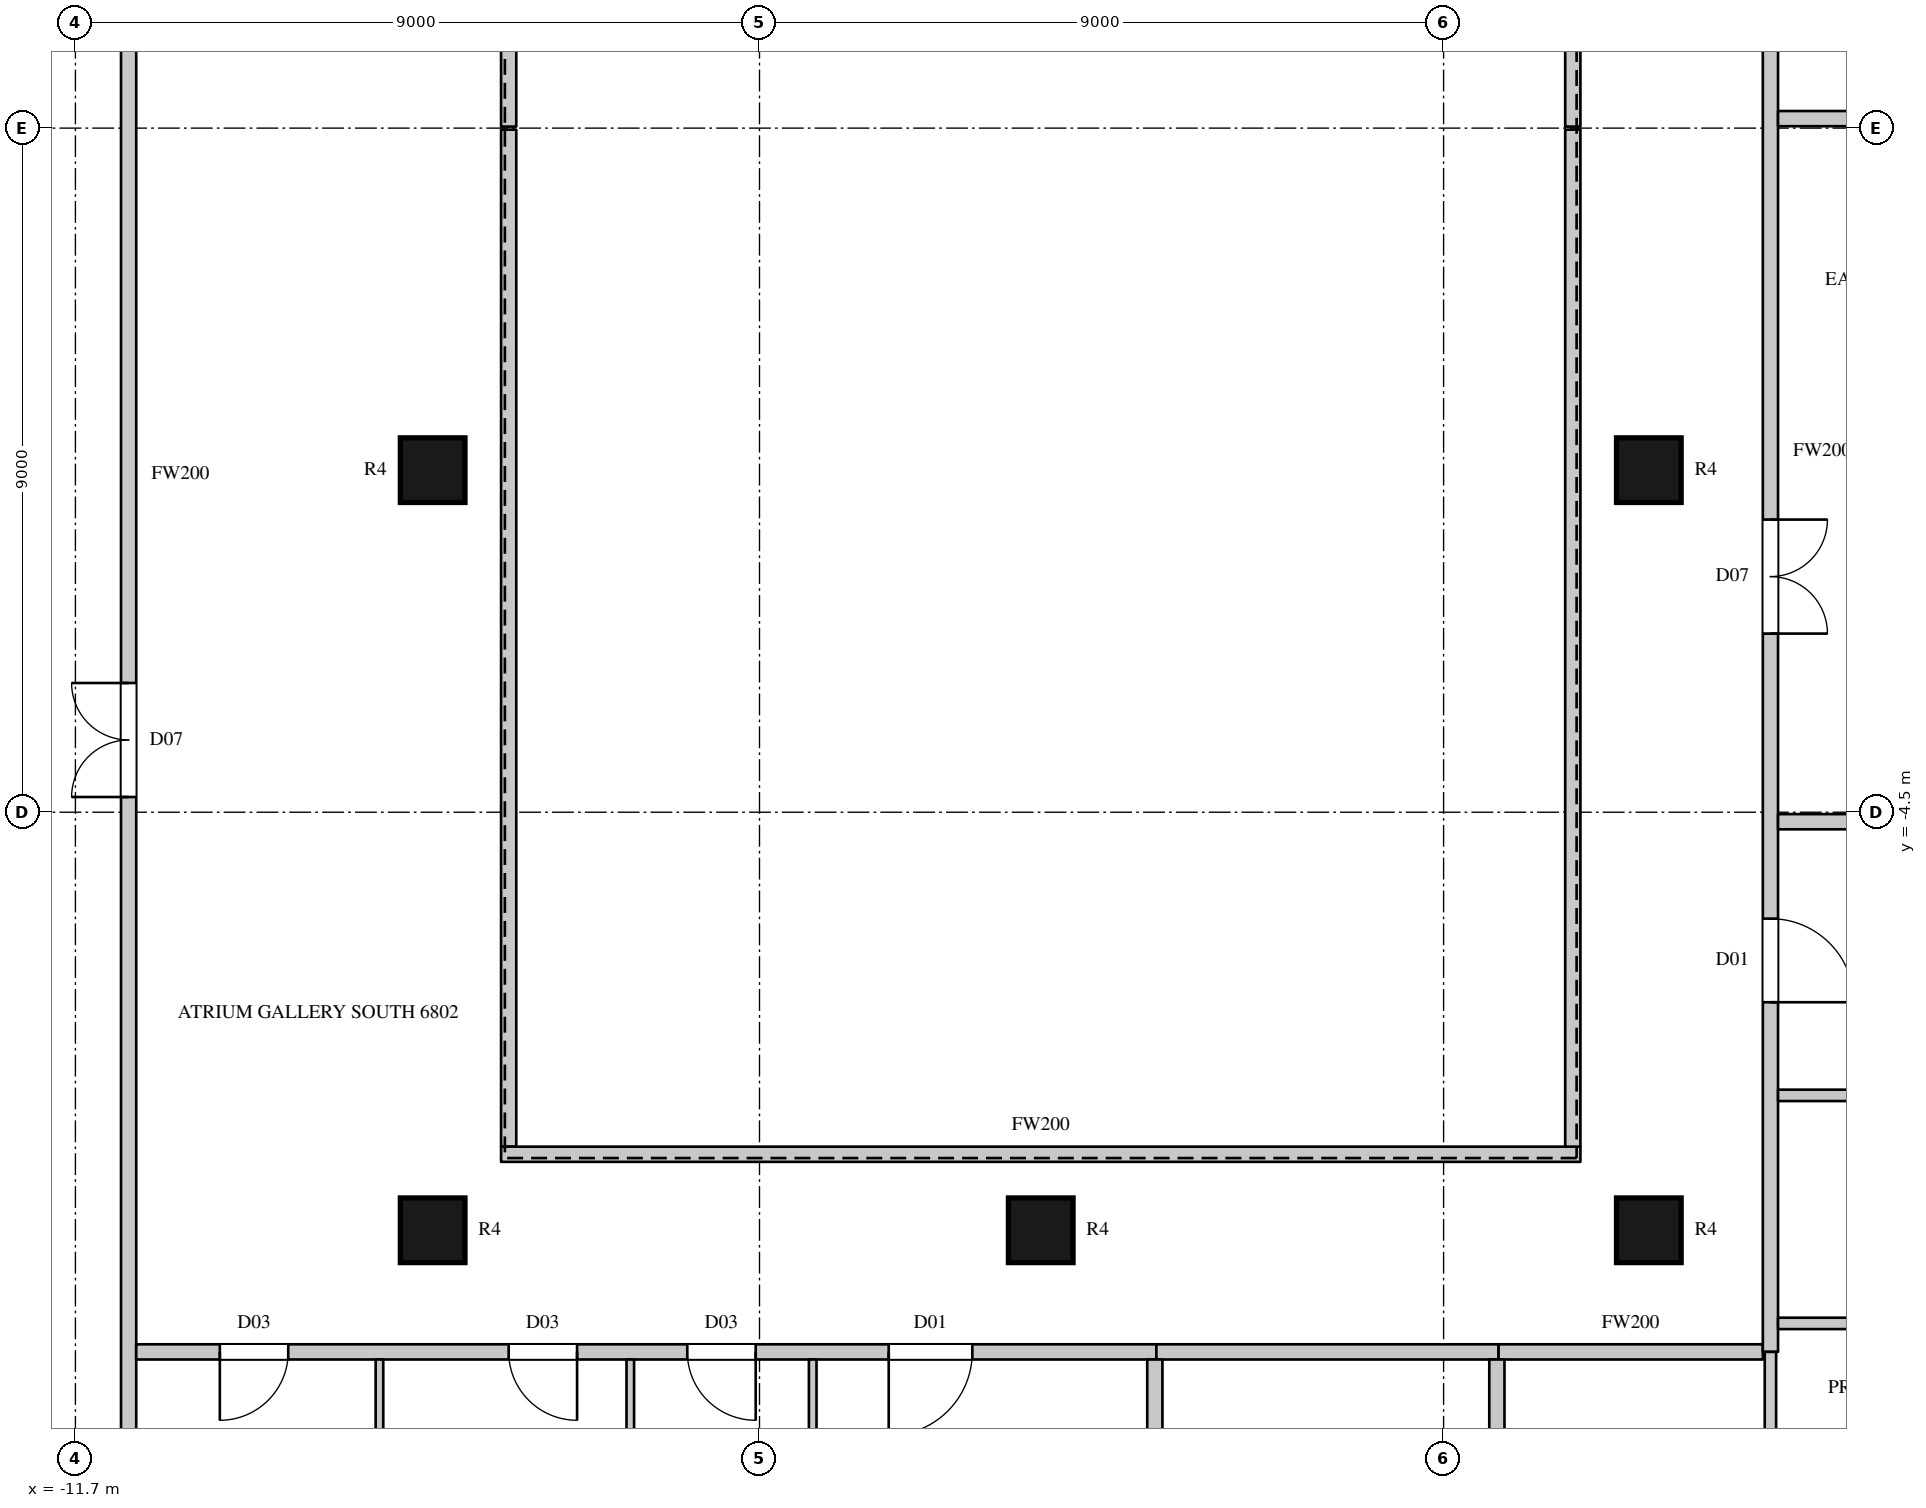
"""IFC4 building model, lengths in metres.
Left out: names, types, materials, properties, quantities, classifications, styles, units other than length and angle.
Written with IfcOpenShell. Run it as: python <this file> out.ifc"""

import sys

from ifc_helpers import new_model, si_unit, direction, frame, frame_2d, origin, origin_2d, place, context, subcontext, project, spatial, rectangle, circle, extrude, element, fill, save


model = new_model("IFC4")
c1 = context("Model", 3, precision=1e-05, world=origin(), true_north=direction((0.0, 1.0)))
c2 = subcontext(c1, "Body", "Model", "MODEL_VIEW")
j1 = project(units=[si_unit("LENGTHUNIT", "METRE"), si_unit("PLANEANGLEUNIT", "RADIAN")], contexts=[c1])
p1 = place(None, origin())
s1 = spatial("IfcSite", under=j1, at=p1, CompositionType="ELEMENT")
p2 = place(p1, origin())
s2 = spatial("IfcBuilding", under=s1, at=p2, CompositionType="ELEMENT")
p3 = place(p2, frame((0.0, 0.0, 300.8)))
s3 = spatial("IfcBuildingStorey", under=s2, at=p3, CompositionType="ELEMENT", Elevation=300.8)
for number, where, z_axis, x_axis in (
    (1, (-7.0, -10.0, 0.0), (0.0, 0.0, 1.0), (1.0, 0.0, 0.0)),
    (2, (-7.0, 0.0, 0.0), (0.0, 0.0, 1.0), (1.0, 0.0, 0.0)),
    (3, (1.0, -10.0, 0.0), (0.0, 0.0, 1.0), (1.0, 0.0, 0.0)),
    (4, (9.0, -10.0, 0.0), (0.0, 0.0, 1.0), (1.0, 0.0, 0.0)),
    (5, (9.0, 0.0, 0.0), (0.0, 0.0, 1.0), (1.0, 0.0, 0.0)),
):
    element("IfcColumn", number, at=place(p3, frame(where, z_axis=z_axis, x_axis=x_axis)), inside=s3, PredefinedType="COLUMN", context=c2, shape_type="SweptSolid", body=[
        extrude(circle(Radius=0.425, at=origin_2d()), origin(), (0.0, 0.0, 1.0), 4.1),
    ])
p4 = place(p3, frame((-11.0, -14.8, 0.0), z_axis=(0.0, 0.0, 1.0), x_axis=(0.0, 1.0, 0.0)))
e6 = element("IfcWall", 6, at=p4, inside=s3, PredefinedType="PARTITIONING", context=c2, shape_type="SweptSolid", body=[
    extrude(rectangle(XDim=29.5, YDim=0.2, at=frame_2d((14.75, 0.0))), origin(), (0.0, 0.0, 1.0), 3.8),
])
p5 = place(p4, frame((10.5, 0.0, 0.0)))
e7 = element("IfcOpeningElement", 7, at=p5, cuts=e6, PredefinedType="OPENING", context=c2, shape_type="SweptSolid", body=[
    extrude(rectangle(XDim=1.5, YDim=2.4, at=frame_2d((0.75, 1.2))), frame((0.0, 0.11, 0.0), z_axis=(0.0, -1.0, 0.0), x_axis=(1.0, 0.0, 0.0)), (0.0, 0.0, 1.0), 0.22),
])
p6 = place(p3, frame((-10.9, -11.6, 0.0), z_axis=(0.0, 0.0, 1.0), x_axis=(1.0, 0.0, 0.0)))
e8 = element("IfcWall", 8, at=p6, inside=s3, PredefinedType="PARTITIONING", context=c2, shape_type="SweptSolid", body=[
    extrude(rectangle(XDim=13.421, YDim=0.2, at=frame_2d((6.71, 0.0))), origin(), (0.0, 0.0, 1.0), 3.8),
])
p7 = place(p6, frame((1.1, 0.0, 0.0)))
e9 = element("IfcOpeningElement", 9, at=p7, cuts=e8, PredefinedType="OPENING", context=c2, shape_type="SweptSolid", body=[
    extrude(rectangle(XDim=0.9, YDim=2.2, at=frame_2d((0.45, 1.1))), frame((0.0, 0.11, 0.0), z_axis=(0.0, -1.0, 0.0), x_axis=(1.0, 0.0, 0.0)), (0.0, 0.0, 1.0), 0.22),
])
p8 = place(p6, frame((4.9, 0.0, 0.0)))
e10 = element("IfcOpeningElement", 10, at=p8, cuts=e8, PredefinedType="OPENING", context=c2, shape_type="SweptSolid", body=[
    extrude(rectangle(XDim=0.9, YDim=2.2, at=frame_2d((0.45, 1.1))), frame((0.0, 0.11, 0.0), z_axis=(0.0, -1.0, 0.0), x_axis=(1.0, 0.0, 0.0)), (0.0, 0.0, 1.0), 0.22),
])
p9 = place(p6, frame((7.25, 0.0, 0.0)))
e11 = element("IfcOpeningElement", 11, at=p9, cuts=e8, PredefinedType="OPENING", context=c2, shape_type="SweptSolid", body=[
    extrude(rectangle(XDim=0.9, YDim=2.2, at=frame_2d((0.45, 1.1))), frame((0.0, 0.11, 0.0), z_axis=(0.0, -1.0, 0.0), x_axis=(1.0, 0.0, 0.0)), (0.0, 0.0, 1.0), 0.22),
])
p10 = place(p6, frame((9.9, 0.0, 0.0)))
e12 = element("IfcOpeningElement", 12, at=p10, cuts=e8, PredefinedType="OPENING", context=c2, shape_type="SweptSolid", body=[
    extrude(rectangle(XDim=1.1, YDim=2.4, at=frame_2d((0.55, 1.2))), frame((0.0, 0.11, 0.0), z_axis=(0.0, -1.0, 0.0), x_axis=(1.0, 0.0, 0.0)), (0.0, 0.0, 1.0), 0.22),
])
p11 = place(p3, frame((-6.0, -8.9, 0.0), z_axis=(0.0, 0.0, 1.0), x_axis=(0.0, 1.0, 0.0)))
e13 = element("IfcWall", 13, at=p11, inside=s3, PredefinedType="PARTITIONING", context=c2, shape_type="SweptSolid", body=[
    extrude(rectangle(XDim=13.38, YDim=0.2, at=frame_2d((6.69, 0.0))), origin(), (0.0, 0.0, 1.0), 3.8),
])
p12 = place(p3, frame((-6.1, -9.0, 0.0), z_axis=(0.0, 0.0, 1.0), x_axis=(1.0, 0.0, 0.0)))
e14 = element("IfcWall", 14, at=p12, inside=s3, PredefinedType="PARTITIONING", context=c2, shape_type="SweptSolid", body=[
    extrude(rectangle(XDim=14.2, YDim=0.2, at=frame_2d((7.1, 0.0))), origin(), (0.0, 0.0, 1.0), 3.8),
])
p13 = place(p3, frame((-6.0, 4.52, 0.0), z_axis=(0.0, 0.0, 1.0), x_axis=(0.0, 1.0, 0.0)))
e15 = element("IfcWall", 15, at=p13, inside=s3, PredefinedType="PARTITIONING", context=c2, shape_type="SweptSolid", body=[
    extrude(rectangle(XDim=4.38, YDim=0.2, at=frame_2d((2.19, 0.0))), origin(), (0.0, 0.0, 1.0), 3.8),
])
p14 = place(p3, frame((7.021, -11.6, 0.0), z_axis=(0.0, 0.0, 1.0), x_axis=(1.0, 0.0, 0.0)))
e16 = element("IfcWall", 16, at=p14, inside=s3, PredefinedType="PARTITIONING", context=c2, shape_type="SweptSolid", body=[
    extrude(rectangle(XDim=3.479, YDim=0.2, at=frame_2d((1.74, 0.0))), origin(), (0.0, 0.0, 1.0), 3.8),
])
p15 = place(p3, frame((8.0, -8.9, 0.0), z_axis=(0.0, 0.0, 1.0), x_axis=(0.0, 1.0, 0.0)))
e17 = element("IfcWall", 17, at=p15, inside=s3, PredefinedType="PARTITIONING", context=c2, shape_type="SweptSolid", body=[
    extrude(rectangle(XDim=13.38, YDim=0.2, at=frame_2d((6.69, 0.0))), origin(), (0.0, 0.0, 1.0), 3.8),
])
p16 = place(p3, frame((8.0, 4.52, 0.0), z_axis=(0.0, 0.0, 1.0), x_axis=(0.0, 1.0, 0.0)))
e18 = element("IfcWall", 18, at=p16, inside=s3, PredefinedType="PARTITIONING", context=c2, shape_type="SweptSolid", body=[
    extrude(rectangle(XDim=4.38, YDim=0.2, at=frame_2d((2.19, 0.0))), origin(), (0.0, 0.0, 1.0), 3.8),
])
p17 = place(p3, frame((10.6, -11.6, 0.0), z_axis=(0.0, 0.0, 1.0), x_axis=(0.0, 1.0, 0.0)))
e19 = element("IfcWall", 19, at=p17, inside=s3, PredefinedType="PARTITIONING", context=c2, shape_type="SweptSolid", body=[
    extrude(rectangle(XDim=23.7, YDim=0.2, at=frame_2d((11.85, 0.0))), origin(), (0.0, 0.0, 1.0), 3.8),
])
p18 = place(p17, frame((9.45, 0.0, 0.0)))
e20 = element("IfcOpeningElement", 20, at=p18, cuts=e19, PredefinedType="OPENING", context=c2, shape_type="SweptSolid", body=[
    extrude(rectangle(XDim=1.5, YDim=2.4, at=frame_2d((0.75, 1.2))), frame((0.0, 0.11, 0.0), z_axis=(0.0, -1.0, 0.0), x_axis=(1.0, 0.0, 0.0)), (0.0, 0.0, 1.0), 0.22),
])
p19 = place(p17, frame((19.45, 0.0, 0.0)))
e21 = element("IfcOpeningElement", 21, at=p19, cuts=e19, PredefinedType="OPENING", context=c2, shape_type="SweptSolid", body=[
    extrude(rectangle(XDim=1.1, YDim=2.4, at=frame_2d((0.55, 1.2))), frame((0.0, 0.11, 0.0), z_axis=(0.0, -1.0, 0.0), x_axis=(1.0, 0.0, 0.0)), (0.0, 0.0, 1.0), 0.22),
])
p20 = place(p17, frame((4.6, 0.0, 0.0)))
e22 = element("IfcOpeningElement", 22, at=p20, cuts=e19, PredefinedType="OPENING", context=c2, shape_type="SweptSolid", body=[
    extrude(rectangle(XDim=1.1, YDim=2.4, at=frame_2d((0.55, 1.2))), frame((0.0, 0.11, 0.0), z_axis=(0.0, -1.0, 0.0), x_axis=(1.0, 0.0, 0.0)), (0.0, 0.0, 1.0), 0.22),
])
for number, where, z_axis, x_axis in (
    (23, (10.7, -4.625, 0.0), (0.0, 0.0, 1.0), (1.0, 0.0, 0.0)),
    (24, (10.7, 4.625, 0.0), (0.0, 0.0, 1.0), (1.0, 0.0, 0.0)),
):
    element("IfcWall", number, at=place(p3, frame(where, z_axis=z_axis, x_axis=x_axis)), inside=s3, PredefinedType="PARTITIONING", context=c2, shape_type="SweptSolid", body=[
        extrude(rectangle(XDim=3.975, YDim=0.2, at=frame_2d((1.988, 0.0))), origin(), (0.0, 0.0, 1.0), 3.8),
    ])
p21 = place(p3, frame((10.6, -20.864, 0.0), z_axis=(0.0, 0.0, 1.0), x_axis=(0.0, 1.0, 0.0)))
e25 = element("IfcWall", 25, at=p21, inside=s3, PredefinedType="PARTITIONING", context=c2, shape_type="SweptSolid", body=[
    extrude(rectangle(XDim=9.264, YDim=0.15, at=frame_2d((4.632, 0.0))), origin(), (0.0, 0.0, 1.0), 3.8),
])
p22 = place(p3, frame((10.7, -11.225, 0.0), z_axis=(0.0, 0.0, 1.0), x_axis=(1.0, 0.0, 0.0)))
e26 = element("IfcWall", 26, at=p22, inside=s3, PredefinedType="PARTITIONING", context=c2, shape_type="SweptSolid", body=[
    extrude(rectangle(XDim=3.425, YDim=0.15, at=frame_2d((1.712, 0.0))), origin(), (0.0, 0.0, 1.0), 3.8),
])
p23 = place(p3, frame((10.7, -8.225, 0.0), z_axis=(0.0, 0.0, 1.0), x_axis=(1.0, 0.0, 0.0)))
e27 = element("IfcWall", 27, at=p23, inside=s3, PredefinedType="PARTITIONING", context=c2, shape_type="SweptSolid", body=[
    extrude(rectangle(XDim=3.575, YDim=0.15, at=frame_2d((1.788, 0.0))), origin(), (0.0, 0.0, 1.0), 3.15),
])
p24 = place(p23, frame((1.25, 0.0, 0.0)))
e28 = element("IfcOpeningElement", 28, at=p24, cuts=e27, PredefinedType="OPENING", context=c2, shape_type="SweptSolid", body=[
    extrude(rectangle(XDim=0.95, YDim=2.2, at=frame_2d((0.475, 1.1))), frame((0.0, 0.085, 0.0), z_axis=(0.0, -1.0, 0.0), x_axis=(1.0, 0.0, 0.0)), (0.0, 0.0, 1.0), 0.17),
])
p25 = place(p3, frame((2.521, -11.6, 0.0), z_axis=(0.0, 0.0, 1.0), x_axis=(1.0, 0.0, 0.0)))
e29 = element("IfcWall", 29, at=p25, inside=s3, PredefinedType="PARTITIONING", context=c2, shape_type="SweptSolid", body=[
    extrude(rectangle(XDim=4.5, YDim=0.2, at=frame_2d((2.25, 0.0))), origin(), (0.0, 0.0, 1.0), 3.8),
])
p26 = place(p3, frame((2.501, -15.7, 0.0), z_axis=(0.0, 0.0, 1.0), x_axis=(0.0, 1.0, 0.0)))
e30 = element("IfcWall", 30, at=p26, inside=s3, PredefinedType="PARTITIONING", context=c2, shape_type="SweptSolid", body=[
    extrude(rectangle(XDim=4.0, YDim=0.2, at=frame_2d((2.0, 0.0))), origin(), (0.0, 0.0, 1.0), 3.8),
])
p27 = place(p26, frame((0.15, 0.0, 0.0)))
e31 = element("IfcOpeningElement", 31, at=p27, cuts=e30, PredefinedType="OPENING", context=c2, shape_type="SweptSolid", body=[
    extrude(rectangle(XDim=0.9, YDim=2.2, at=frame_2d((0.45, 1.1))), frame((0.0, 0.11, 0.0), z_axis=(0.0, -1.0, 0.0), x_axis=(1.0, 0.0, 0.0)), (0.0, 0.0, 1.0), 0.22),
])
p28 = place(p3, frame((7.001, -15.7, 0.0), z_axis=(0.0, 0.0, 1.0), x_axis=(0.0, 1.0, 0.0)))
e32 = element("IfcWall", 32, at=p28, inside=s3, PredefinedType="PARTITIONING", context=c2, shape_type="SweptSolid", body=[
    extrude(rectangle(XDim=4.0, YDim=0.2, at=frame_2d((2.0, 0.0))), origin(), (0.0, 0.0, 1.0), 3.8),
])
for number, where, z_axis, x_axis in (
    (33, (-7.7, -24.04, 0.0), (0.0, 0.0, 1.0), (0.0, 1.0, 0.0)),
    (34, (-4.4, -24.04, 0.0), (0.0, 0.0, 1.0), (0.0, 1.0, 0.0)),
):
    element("IfcWall", number, at=place(p3, frame(where, z_axis=z_axis, x_axis=x_axis)), inside=s3, PredefinedType="PARTITIONING", context=c2, shape_type="SweptSolid", body=[
        extrude(rectangle(XDim=12.34, YDim=0.1, at=frame_2d((6.17, 0.0))), origin(), (0.0, 0.0, 1.0), 3.8),
    ])
p29 = place(p3, frame((-2.0, -23.447, 0.0), z_axis=(0.0, 0.0, 1.0), x_axis=(0.0, 1.0, 0.0)))
e35 = element("IfcWall", 35, at=p29, inside=s3, PredefinedType="PARTITIONING", context=c2, shape_type="SweptSolid", body=[
    extrude(rectangle(XDim=11.747, YDim=0.1, at=frame_2d((5.874, 0.0))), origin(), (0.0, 0.0, 1.0), 3.8),
])
p30 = place(p5, origin())
e36 = element("IfcDoor", 36, at=p30, inside=s3, OperationType="DOUBLE_DOOR_SINGLE_SWING", PredefinedType="DOOR", context=c2, shape_type="SweptSolid", body=[
    extrude(rectangle(XDim=1.5, YDim=2.4, at=frame_2d((0.75, 1.2))), frame((0.0, 0.025, 0.0), z_axis=(0.0, -1.0, 0.0), x_axis=(1.0, 0.0, 0.0)), (0.0, 0.0, 1.0), 0.05),
])
fill(e7, e36)
p31 = place(p18, origin())
e37 = element("IfcDoor", 37, at=p31, inside=s3, OperationType="DOUBLE_DOOR_SINGLE_SWING", PredefinedType="DOOR", context=c2, shape_type="SweptSolid", body=[
    extrude(rectangle(XDim=1.5, YDim=2.4, at=frame_2d((0.75, 1.2))), frame((0.0, 0.025, 0.0), z_axis=(0.0, -1.0, 0.0), x_axis=(1.0, 0.0, 0.0)), (0.0, 0.0, 1.0), 0.05),
])
fill(e20, e37)
p32 = place(p7, origin())
e38 = element("IfcDoor", 38, at=p32, inside=s3, OperationType="SINGLE_SWING_RIGHT", PredefinedType="DOOR", context=c2, shape_type="SweptSolid", body=[
    extrude(rectangle(XDim=0.9, YDim=2.2, at=frame_2d((0.45, 1.1))), frame((0.0, 0.025, 0.0), z_axis=(0.0, -1.0, 0.0), x_axis=(1.0, 0.0, 0.0)), (0.0, 0.0, 1.0), 0.05),
])
fill(e9, e38)
p33 = place(p8, origin())
e39 = element("IfcDoor", 39, at=p33, inside=s3, OperationType="SINGLE_SWING_LEFT", PredefinedType="DOOR", context=c2, shape_type="SweptSolid", body=[
    extrude(rectangle(XDim=0.9, YDim=2.2, at=frame_2d((0.45, 1.1))), frame((0.0, 0.025, 0.0), z_axis=(0.0, -1.0, 0.0), x_axis=(1.0, 0.0, 0.0)), (0.0, 0.0, 1.0), 0.05),
])
fill(e10, e39)
p34 = place(p9, origin())
e40 = element("IfcDoor", 40, at=p34, inside=s3, OperationType="SINGLE_SWING_LEFT", PredefinedType="DOOR", context=c2, shape_type="SweptSolid", body=[
    extrude(rectangle(XDim=0.9, YDim=2.2, at=frame_2d((0.45, 1.1))), frame((0.0, 0.025, 0.0), z_axis=(0.0, -1.0, 0.0), x_axis=(1.0, 0.0, 0.0)), (0.0, 0.0, 1.0), 0.05),
])
fill(e11, e40)
p35 = place(p10, origin())
e41 = element("IfcDoor", 41, at=p35, inside=s3, OperationType="SINGLE_SWING_RIGHT", PredefinedType="DOOR", context=c2, shape_type="SweptSolid", body=[
    extrude(rectangle(XDim=1.1, YDim=2.4, at=frame_2d((0.55, 1.2))), frame((0.0, 0.025, 0.0), z_axis=(0.0, -1.0, 0.0), x_axis=(1.0, 0.0, 0.0)), (0.0, 0.0, 1.0), 0.05),
])
fill(e12, e41)
p36 = place(p20, origin())
e42 = element("IfcDoor", 42, at=p36, inside=s3, OperationType="SINGLE_SWING_RIGHT", PredefinedType="DOOR", context=c2, shape_type="SweptSolid", body=[
    extrude(rectangle(XDim=1.1, YDim=2.4, at=frame_2d((0.55, 1.2))), frame((0.0, 0.025, 0.0), z_axis=(0.0, -1.0, 0.0), x_axis=(1.0, 0.0, 0.0)), (0.0, 0.0, 1.0), 0.05),
])
fill(e22, e42)
save(model, sys.argv[1])
